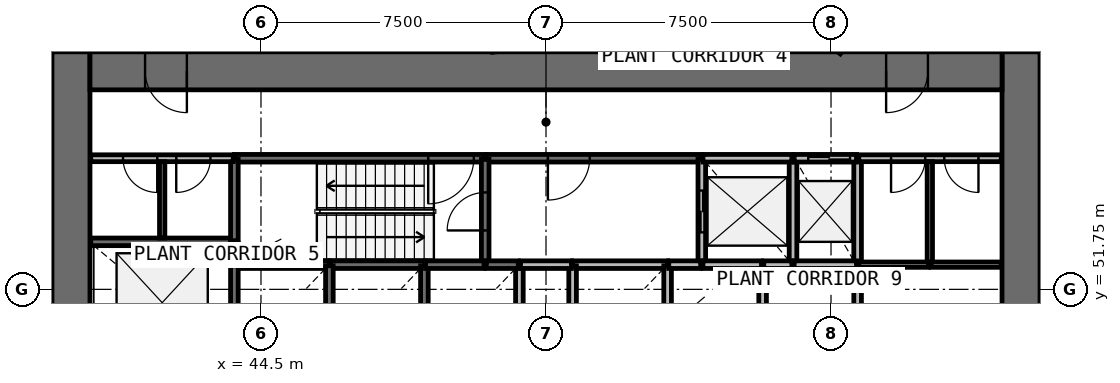
"""IFC4 building model, lengths in metres.
Left out: names, types, materials, properties, quantities, classifications, styles, units other than length and angle.
Written with IfcOpenShell. Run it as: python <this file> out.ifc"""

import sys

from ifc_helpers import new_model, si_unit, direction, frame, frame_2d, origin, place, context, subcontext, project, spatial, rectangle, extrude, source, transform, mapped, element, fill, save


model = new_model("IFC4")
c1 = context("Model", 3, precision=1e-05, world=origin(), true_north=direction((0.0, 1.0)))
c2 = subcontext(c1, "Body", "Model", "MODEL_VIEW")
j1 = project(units=[si_unit("LENGTHUNIT", "METRE"), si_unit("PLANEANGLEUNIT", "RADIAN")], contexts=[c1])
p1 = place(None, origin())
s1 = spatial("IfcSite", under=j1, at=p1, CompositionType="ELEMENT")
p2 = place(p1, origin())
s2 = spatial("IfcBuilding", under=s1, at=p2, CompositionType="ELEMENT")
p3 = place(p2, frame((0.0, 0.0, 75.4)))
s3 = spatial("IfcBuildingStorey", under=s2, at=p3, CompositionType="ELEMENT", Elevation=75.4)
p4 = place(p3, frame((64.5, 38.0, 0.0), z_axis=(0.0, 0.0, 1.0), x_axis=(0.0, 1.0, 0.0)))
e1 = element("IfcWall", 1, at=p4, inside=s3, PredefinedType="SHEAR", context=c2, shape_type="SweptSolid", body=[
    extrude(rectangle(XDim=20.0, YDim=1.0, at=frame_2d((10.0, 0.0))), origin(), (0.0, 0.0, 1.0), 4.4),
])
p5 = place(p4, frame((9.1, 0.0, 0.0)))
e2 = element("IfcOpeningElement", 2, at=p5, cuts=e1, PredefinedType="OPENING", context=c2, shape_type="SweptSolid", body=[
    extrude(rectangle(XDim=1.8, YDim=2.1, at=frame_2d((0.9, 1.05))), frame((0.0, 0.51, 0.0), z_axis=(0.0, -1.0, 0.0), x_axis=(1.0, 0.0, 0.0)), (0.0, 0.0, 1.0), 1.02),
])
p6 = place(p3, frame((39.5, 58.0, 0.0), z_axis=(0.0, 0.0, 1.0), x_axis=(0.0, -1.0, 0.0)))
e3 = element("IfcWall", 3, at=p6, inside=s3, PredefinedType="SHEAR", context=c2, shape_type="SweptSolid", body=[
    extrude(rectangle(XDim=20.0, YDim=1.0, at=frame_2d((10.0, 0.0))), origin(), (0.0, 0.0, 1.0), 4.4),
])
p7 = place(p6, frame((9.1, 0.0, 0.0)))
e4 = element("IfcOpeningElement", 4, at=p7, cuts=e3, PredefinedType="OPENING", context=c2, shape_type="SweptSolid", body=[
    extrude(rectangle(XDim=1.8, YDim=2.1, at=frame_2d((0.9, 1.05))), frame((0.0, 0.51, 0.0), z_axis=(0.0, -1.0, 0.0), x_axis=(1.0, 0.0, 0.0)), (0.0, 0.0, 1.0), 1.02),
])
p8 = place(p3, frame((64.0, 57.5, 0.0), z_axis=(0.0, 0.0, 1.0), x_axis=(-1.0, 0.0, 0.0)))
e5 = element("IfcWall", 5, at=p8, inside=s3, PredefinedType="SHEAR", context=c2, shape_type="SweptSolid", body=[
    extrude(rectangle(XDim=24.0, YDim=1.0, at=frame_2d((12.0, 0.0))), origin(), (0.0, 0.0, 1.0), 4.4),
])
p9 = place(p8, frame((21.45, 0.0, 0.0)))
e6 = element("IfcOpeningElement", 6, at=p9, cuts=e5, PredefinedType="OPENING", context=c2, shape_type="SweptSolid", body=[
    extrude(rectangle(XDim=1.1, YDim=2.1, at=frame_2d((0.55, 1.05))), frame((0.0, 0.51, 0.0), z_axis=(0.0, -1.0, 0.0), x_axis=(1.0, 0.0, 0.0)), (0.0, 0.0, 1.0), 1.02),
])
p10 = place(p8, frame((1.95, 0.0, 0.0)))
e7 = element("IfcOpeningElement", 7, at=p10, cuts=e5, PredefinedType="OPENING", context=c2, shape_type="SweptSolid", body=[
    extrude(rectangle(XDim=1.1, YDim=2.1, at=frame_2d((0.55, 1.05))), frame((0.0, 0.51, 0.0), z_axis=(0.0, -1.0, 0.0), x_axis=(1.0, 0.0, 0.0)), (0.0, 0.0, 1.0), 1.02),
])
p11 = place(p3, frame((50.4, 55.2, 0.0), z_axis=(0.0, 0.0, 1.0), x_axis=(-1.0, 0.0, 0.0)))
e8 = element("IfcWall", 8, at=p11, inside=s3, PredefinedType="SOLIDWALL", context=c2, shape_type="SweptSolid", body=[
    extrude(rectangle(XDim=6.6, YDim=0.2, at=frame_2d((3.3, 0.0))), origin(), (0.0, 0.0, 1.0), 4.0),
])
p12 = place(p11, frame((0.3, 0.0, 0.0)))
e9 = element("IfcOpeningElement", 9, at=p12, cuts=e8, PredefinedType="OPENING", context=c2, shape_type="SweptSolid", body=[
    extrude(rectangle(XDim=1.2, YDim=2.1, at=frame_2d((0.6, 1.05))), frame((0.0, 0.11, 0.0), z_axis=(0.0, -1.0, 0.0), x_axis=(1.0, 0.0, 0.0)), (0.0, 0.0, 1.0), 0.22),
])
p13 = place(p3, frame((56.1, 55.2, 0.0), z_axis=(0.0, 0.0, 1.0), x_axis=(-1.0, 0.0, 0.0)))
e10 = element("IfcWall", 10, at=p13, inside=s3, PredefinedType="SOLIDWALL", context=c2, shape_type="SweptSolid", body=[
    extrude(rectangle(XDim=5.67, YDim=0.2, at=frame_2d((2.835, 0.0))), origin(), (0.0, 0.0, 1.0), 4.0),
])
p14 = place(p13, frame((2.95, 0.0, 0.0)))
e11 = element("IfcOpeningElement", 11, at=p14, cuts=e10, PredefinedType="OPENING", context=c2, shape_type="SweptSolid", body=[
    extrude(rectangle(XDim=1.1, YDim=2.1, at=frame_2d((0.55, 1.05))), frame((0.0, 0.11, 0.0), z_axis=(0.0, -1.0, 0.0), x_axis=(1.0, 0.0, 0.0)), (0.0, 0.0, 1.0), 0.22),
])
p15 = place(p3, frame((43.8, 53.0, 0.0), z_axis=(0.0, 0.0, 1.0), x_axis=(-1.0, 0.0, 0.0)))
e12 = element("IfcWall", 12, at=p15, inside=s3, PredefinedType="SOLIDWALL", context=c2, shape_type="SweptSolid", body=[
    extrude(rectangle(XDim=3.78, YDim=0.2, at=frame_2d((1.89, 0.0))), origin(), (0.0, 0.0, 1.0), 4.0),
])
p16 = place(p3, frame((50.4, 52.4, 0.0), z_axis=(0.0, 0.0, 1.0), x_axis=(0.0, 1.0, 0.0)))
e13 = element("IfcWall", 13, at=p16, inside=s3, PredefinedType="SOLIDWALL", context=c2, shape_type="SweptSolid", body=[
    extrude(rectangle(XDim=2.77, YDim=0.2, at=frame_2d((1.385, 0.0))), origin(), (0.0, 0.0, 1.0), 4.0),
])
p17 = place(p16, frame((0.9, 0.0, 0.0)))
e14 = element("IfcOpeningElement", 14, at=p17, cuts=e13, PredefinedType="OPENING", context=c2, shape_type="SweptSolid", body=[
    extrude(rectangle(XDim=1.0, YDim=2.1, at=frame_2d((0.5, 1.05))), frame((0.0, 0.11, 0.0), z_axis=(0.0, -1.0, 0.0), x_axis=(1.0, 0.0, 0.0)), (0.0, 0.0, 1.0), 0.22),
])
p18 = place(p3, frame((56.1, 55.17, 0.0), z_axis=(0.0, 0.0, 1.0), x_axis=(0.0, -1.0, 0.0)))
e15 = element("IfcWall", 15, at=p18, inside=s3, PredefinedType="SOLIDWALL", context=c2, shape_type="SweptSolid", body=[
    extrude(rectangle(XDim=2.77, YDim=0.2, at=frame_2d((1.385, 0.0))), origin(), (0.0, 0.0, 1.0), 4.0),
])
p19 = place(p18, frame((0.82, 0.0, 0.0)))
e16 = element("IfcOpeningElement", 16, at=p19, cuts=e15, PredefinedType="OPENING", context=c2, shape_type="SweptSolid", body=[
    extrude(rectangle(XDim=1.1, YDim=2.1, at=frame_2d((0.55, 1.05))), frame((0.0, 0.11, 0.0), z_axis=(0.0, -1.0, 0.0), x_axis=(1.0, 0.0, 0.0)), (0.0, 0.0, 1.0), 0.22),
])
for number, where, z_axis, x_axis in (
    (17, (58.5, 52.4, 0.0), (0.0, 0.0, 1.0), (0.0, 1.0, 0.0)),
    (18, (60.2, 52.4, 0.0), (0.0, 0.0, 1.0), (0.0, 1.0, 0.0)),
):
    element("IfcWall", number, at=place(p3, frame(where, z_axis=z_axis, x_axis=x_axis)), inside=s3, PredefinedType="SOLIDWALL", context=c2, shape_type="SweptSolid", body=[
        extrude(rectangle(XDim=2.8, YDim=0.2, at=frame_2d((1.4, 0.0))), origin(), (0.0, 0.0, 1.0), 4.0),
    ])
p20 = place(p3, frame((46.3, 52.4, 0.0), z_axis=(0.0, 0.0, 1.0), x_axis=(-1.0, 0.0, 0.0)))
e19 = element("IfcWall", 19, at=p20, inside=s3, PredefinedType="SOLIDWALL", context=c2, shape_type="SweptSolid", body=[
    extrude(rectangle(XDim=2.5, YDim=0.2, at=frame_2d((1.25, 0.0))), origin(), (0.0, 0.0, 1.0), 4.0),
])
p21 = place(p3, frame((48.8, 52.4, 0.0), z_axis=(0.0, 0.0, 1.0), x_axis=(-1.0, 0.0, 0.0)))
e20 = element("IfcWall", 20, at=p21, inside=s3, PredefinedType="SOLIDWALL", context=c2, shape_type="SweptSolid", body=[
    extrude(rectangle(XDim=2.47, YDim=0.2, at=frame_2d((1.235, 0.0))), origin(), (0.0, 0.0, 1.0), 4.0),
])
p22 = place(p3, frame((55.2, 52.4, 0.0), z_axis=(0.0, 0.0, 1.0), x_axis=(-1.0, 0.0, 0.0)))
e21 = element("IfcWall", 21, at=p22, inside=s3, PredefinedType="SOLIDWALL", context=c2, shape_type="SweptSolid", body=[
    extrude(rectangle(XDim=2.5, YDim=0.2, at=frame_2d((1.25, 0.0))), origin(), (0.0, 0.0, 1.0), 4.0),
])
p23 = place(p3, frame((58.47, 55.2, 0.0), z_axis=(0.0, 0.0, 1.0), x_axis=(-1.0, 0.0, 0.0)))
e22 = element("IfcWall", 22, at=p23, inside=s3, PredefinedType="SOLIDWALL", context=c2, shape_type="SweptSolid", body=[
    extrude(rectangle(XDim=2.34, YDim=0.2, at=frame_2d((1.17, 0.0))), origin(), (0.0, 0.0, 1.0), 4.0),
])
for number, where, z_axis, x_axis in (
    (23, (43.8, 52.37, 0.0), (0.0, 0.0, 1.0), (0.0, -1.0, 0.0)),
    (24, (46.3, 50.01, 0.0), (0.0, 0.0, 1.0), (0.0, 1.0, 0.0)),
    (25, (48.8, 50.01, 0.0), (0.0, 0.0, 1.0), (0.0, 1.0, 0.0)),
):
    element("IfcWall", number, at=place(p3, frame(where, z_axis=z_axis, x_axis=x_axis)), inside=s3, PredefinedType="SOLIDWALL", context=c2, shape_type="SweptSolid", body=[
        extrude(rectangle(XDim=2.36, YDim=0.2, at=frame_2d((1.18, 0.0))), origin(), (0.0, 0.0, 1.0), 4.0),
    ])
p24 = place(p3, frame((51.3, 50.01, 0.0), z_axis=(0.0, 0.0, 1.0), x_axis=(0.0, 1.0, 0.0)))
e26 = element("IfcWall", 26, at=p24, inside=s3, PredefinedType="SOLIDWALL", context=c2, shape_type="SweptSolid", body=[
    extrude(rectangle(XDim=2.39, YDim=0.2, at=frame_2d((1.195, 0.0))), origin(), (0.0, 0.0, 1.0), 4.0),
])
for number, where, z_axis, x_axis in (
    (27, (52.7, 52.37, 0.0), (0.0, 0.0, 1.0), (0.0, -1.0, 0.0)),
    (28, (55.2, 50.01, 0.0), (0.0, 0.0, 1.0), (0.0, 1.0, 0.0)),
):
    element("IfcWall", number, at=place(p3, frame(where, z_axis=z_axis, x_axis=x_axis)), inside=s3, PredefinedType="SOLIDWALL", context=c2, shape_type="SweptSolid", body=[
        extrude(rectangle(XDim=2.36, YDim=0.2, at=frame_2d((1.18, 0.0))), origin(), (0.0, 0.0, 1.0), 4.0),
    ])
p25 = place(p3, frame((57.7, 50.01, 0.0), z_axis=(0.0, 0.0, 1.0), x_axis=(0.0, 1.0, 0.0)))
e29 = element("IfcWall", 29, at=p25, inside=s3, PredefinedType="SOLIDWALL", context=c2, shape_type="SweptSolid", body=[
    extrude(rectangle(XDim=2.39, YDim=0.2, at=frame_2d((1.195, 0.0))), origin(), (0.0, 0.0, 1.0), 4.0),
])
p26 = place(p3, frame((60.2, 50.01, 0.0), z_axis=(0.0, 0.0, 1.0), x_axis=(0.0, 1.0, 0.0)))
e30 = element("IfcWall", 30, at=p26, inside=s3, PredefinedType="SOLIDWALL", context=c2, shape_type="SweptSolid", body=[
    extrude(rectangle(XDim=2.36, YDim=0.2, at=frame_2d((1.18, 0.0))), origin(), (0.0, 0.0, 1.0), 4.0),
])
p27 = place(p3, frame((43.8, 55.17, 0.0), z_axis=(0.0, 0.0, 1.0), x_axis=(0.0, -1.0, 0.0)))
e31 = element("IfcWall", 31, at=p27, inside=s3, PredefinedType="SOLIDWALL", context=c2, shape_type="SweptSolid", body=[
    extrude(rectangle(XDim=2.14, YDim=0.2, at=frame_2d((1.07, 0.0))), origin(), (0.0, 0.0, 1.0), 4.0),
])
p28 = place(p3, frame((60.17, 52.4, 0.0), z_axis=(0.0, 0.0, 1.0), x_axis=(-1.0, 0.0, 0.0)))
e32 = element("IfcWall", 32, at=p28, inside=s3, PredefinedType="SOLIDWALL", context=c2, shape_type="SweptSolid", body=[
    extrude(rectangle(XDim=1.64, YDim=0.2, at=frame_2d((0.82, 0.0))), origin(), (0.0, 0.0, 1.0), 4.0),
])
p29 = place(p3, frame((60.17, 55.2, 0.0), z_axis=(0.0, 0.0, 1.0), x_axis=(-1.0, 0.0, 0.0)))
e33 = element("IfcWall", 33, at=p29, inside=s3, PredefinedType="SOLIDWALL", context=c2, shape_type="SweptSolid", body=[
    extrude(rectangle(XDim=1.64, YDim=0.2, at=frame_2d((0.82, 0.0))), origin(), (0.0, 0.0, 1.0), 4.0),
])
p30 = place(p29, frame((0.17, 0.0, 0.0)))
e34 = element("IfcOpeningElement", 34, at=p30, cuts=e33, PredefinedType="OPENING", context=c2, shape_type="SweptSolid", body=[
    extrude(rectangle(XDim=1.1, YDim=2.1, at=frame_2d((0.55, 1.05))), frame((0.0, 0.11, 0.0), z_axis=(0.0, -1.0, 0.0), x_axis=(1.0, 0.0, 0.0)), (0.0, 0.0, 1.0), 0.22),
])
for number, where, z_axis, x_axis in (
    (35, (50.37, 52.4, 0.0), (0.0, 0.0, 1.0), (-1.0, 0.0, 0.0)),
    (36, (57.67, 52.4, 0.0), (0.0, 0.0, 1.0), (-1.0, 0.0, 0.0)),
):
    element("IfcWall", number, at=place(p3, frame(where, z_axis=z_axis, x_axis=x_axis)), inside=s3, PredefinedType="SOLIDWALL", context=c2, shape_type="SweptSolid", body=[
        extrude(rectangle(XDim=1.54, YDim=0.2, at=frame_2d((0.77, 0.0))), origin(), (0.0, 0.0, 1.0), 4.0),
    ])
p31 = place(p3, frame((51.33, 52.4, 0.0), z_axis=(0.0, 0.0, 1.0), x_axis=(1.0, 0.0, 0.0)))
e37 = element("IfcWall", 37, at=p31, inside=s3, PredefinedType="SOLIDWALL", context=c2, shape_type="SweptSolid", body=[
    extrude(rectangle(XDim=1.34, YDim=0.2, at=frame_2d((0.67, 0.0))), origin(), (0.0, 0.0, 1.0), 4.0),
])
for number, where, z_axis, x_axis in (
    (38, (51.27, 52.4, 0.0), (0.0, 0.0, 1.0), (-1.0, 0.0, 0.0)),
    (39, (56.07, 52.4, 0.0), (0.0, 0.0, 1.0), (-1.0, 0.0, 0.0)),
):
    element("IfcWall", number, at=place(p3, frame(where, z_axis=z_axis, x_axis=x_axis)), inside=s3, PredefinedType="SOLIDWALL", context=c2, shape_type="SweptSolid", body=[
        extrude(rectangle(XDim=0.84, YDim=0.2, at=frame_2d((0.42, 0.0))), origin(), (0.0, 0.0, 1.0), 4.0),
    ])
p32 = place(p3, frame((58.47, 52.4, 0.0), z_axis=(0.0, 0.0, 1.0), x_axis=(-1.0, 0.0, 0.0)))
e40 = element("IfcWall", 40, at=p32, inside=s3, PredefinedType="SOLIDWALL", context=c2, shape_type="SweptSolid", body=[
    extrude(rectangle(XDim=0.74, YDim=0.2, at=frame_2d((0.37, 0.0))), origin(), (0.0, 0.0, 1.0), 4.0),
])
p33 = place(p3, frame((43.8, 52.43, 0.0), z_axis=(0.0, 0.0, 1.0), x_axis=(0.0, 1.0, 0.0)))
e41 = element("IfcWall", 41, at=p33, inside=s3, PredefinedType="SOLIDWALL", context=c2, shape_type="SweptSolid", body=[
    extrude(rectangle(XDim=0.54, YDim=0.2, at=frame_2d((0.27, 0.0))), origin(), (0.0, 0.0, 1.0), 4.0),
])
p34 = place(p3, frame((43.77, 55.2, 0.0), z_axis=(0.0, 0.0, 1.0), x_axis=(-1.0, 0.0, 0.0)))
e42 = element("IfcWall", 42, at=p34, inside=s3, PredefinedType="PARTITIONING", context=c2, shape_type="SweptSolid", body=[
    extrude(rectangle(XDim=3.75, YDim=0.18, at=frame_2d((1.875, 0.0))), origin(), (0.0, 0.0, 1.0), 4.0),
])
p35 = place(p34, frame((2.0, 0.0, 0.0)))
e43 = element("IfcOpeningElement", 43, at=p35, cuts=e42, PredefinedType="OPENING", context=c2, shape_type="SweptSolid", body=[
    extrude(rectangle(XDim=0.9, YDim=2.1, at=frame_2d((0.45, 1.05))), frame((0.0, 0.1, 0.0), z_axis=(0.0, -1.0, 0.0), x_axis=(1.0, 0.0, 0.0)), (0.0, 0.0, 1.0), 0.2),
])
p36 = place(p34, frame((0.6, 0.0, 0.0)))
e44 = element("IfcOpeningElement", 44, at=p36, cuts=e42, PredefinedType="OPENING", context=c2, shape_type="SweptSolid", body=[
    extrude(rectangle(XDim=0.9, YDim=2.1, at=frame_2d((0.45, 1.05))), frame((0.0, 0.1, 0.0), z_axis=(0.0, -1.0, 0.0), x_axis=(1.0, 0.0, 0.0)), (0.0, 0.0, 1.0), 0.2),
])
p37 = place(p3, frame((63.98, 55.2, 0.0), z_axis=(0.0, 0.0, 1.0), x_axis=(-1.0, 0.0, 0.0)))
e45 = element("IfcWall", 45, at=p37, inside=s3, PredefinedType="PARTITIONING", context=c2, shape_type="SweptSolid", body=[
    extrude(rectangle(XDim=3.75, YDim=0.18, at=frame_2d((1.875, 0.0))), origin(), (0.0, 0.0, 1.0), 4.0),
])
p38 = place(p37, frame((2.0, 0.0, 0.0)))
e46 = element("IfcOpeningElement", 46, at=p38, cuts=e45, PredefinedType="OPENING", context=c2, shape_type="SweptSolid", body=[
    extrude(rectangle(XDim=0.9, YDim=2.1, at=frame_2d((0.45, 1.05))), frame((0.0, 0.1, 0.0), z_axis=(0.0, -1.0, 0.0), x_axis=(1.0, 0.0, 0.0)), (0.0, 0.0, 1.0), 0.2),
])
p39 = place(p37, frame((0.6, 0.0, 0.0)))
e47 = element("IfcOpeningElement", 47, at=p39, cuts=e45, PredefinedType="OPENING", context=c2, shape_type="SweptSolid", body=[
    extrude(rectangle(XDim=0.9, YDim=2.1, at=frame_2d((0.45, 1.05))), frame((0.0, 0.1, 0.0), z_axis=(0.0, -1.0, 0.0), x_axis=(1.0, 0.0, 0.0)), (0.0, 0.0, 1.0), 0.2),
])
p40 = place(p3, frame((61.446, 60.31, 0.0), z_axis=(0.0, 0.0, 1.0), x_axis=(-0.608737787706, -0.793371480341, 0.0)))
e48 = element("IfcWall", 48, at=p40, inside=s3, PredefinedType="PARTITIONING", context=c2, shape_type="SweptSolid", body=[
    extrude(rectangle(XDim=2.912, YDim=0.18, at=frame_2d((1.456, 0.0))), origin(), (0.0, 0.0, 1.0), 2.8),
])
p41 = place(p40, frame((0.862, 0.0, 0.0)))
e49 = element("IfcOpeningElement", 49, at=p41, cuts=e48, PredefinedType="OPENING", context=c2, shape_type="SweptSolid", body=[
    extrude(rectangle(XDim=1.2, YDim=2.1, at=frame_2d((0.6, 1.05))), frame((0.0, 0.1, 0.0), z_axis=(0.0, -1.0, 0.0), x_axis=(1.0, 0.0, 0.0)), (0.0, 0.0, 1.0), 0.2),
])
p42 = place(p3, frame((50.371, 60.37, 0.0), z_axis=(0.0, 0.0, 1.0), x_axis=(0.13060507681, -0.991434472828, 0.0)))
e50 = element("IfcWall", 50, at=p42, inside=s3, PredefinedType="PARTITIONING", context=c2, shape_type="SweptSolid", body=[
    extrude(rectangle(XDim=2.391, YDim=0.18, at=frame_2d((1.195, 0.0))), origin(), (0.0, 0.0, 1.0), 2.8),
])
p43 = place(p42, frame((0.541, 0.0, 0.0)))
e51 = element("IfcOpeningElement", 51, at=p43, cuts=e50, PredefinedType="OPENING", context=c2, shape_type="SweptSolid", body=[
    extrude(rectangle(XDim=1.2, YDim=2.1, at=frame_2d((0.6, 1.05))), frame((0.0, 0.1, 0.0), z_axis=(0.0, -1.0, 0.0), x_axis=(1.0, 0.0, 0.0)), (0.0, 0.0, 1.0), 0.2),
])
p44 = place(p3, frame((37.168, 59.381, 0.0), z_axis=(0.0, 0.0, 1.0), x_axis=(0.793393624489, -0.608708926023, 0.0)))
e52 = element("IfcWall", 52, at=p44, inside=s3, PredefinedType="PARTITIONING", context=c2, shape_type="SweptSolid", body=[
    extrude(rectangle(XDim=2.309, YDim=0.18, at=frame_2d((1.155, 0.0))), origin(), (0.0, 0.0, 1.0), 2.8),
])
p45 = place(p44, frame((0.459, 0.0, 0.0)))
e53 = element("IfcOpeningElement", 53, at=p45, cuts=e52, PredefinedType="OPENING", context=c2, shape_type="SweptSolid", body=[
    extrude(rectangle(XDim=1.2, YDim=2.1, at=frame_2d((0.6, 1.05))), frame((0.0, 0.1, 0.0), z_axis=(0.0, -1.0, 0.0), x_axis=(1.0, 0.0, 0.0)), (0.0, 0.0, 1.0), 0.2),
])
p46 = place(p3, frame((62.1, 52.4, 0.0), z_axis=(0.0, 0.0, 1.0), x_axis=(0.0, 1.0, 0.0)))
e54 = element("IfcWall", 54, at=p46, inside=s3, PredefinedType="PARTITIONING", context=c2, shape_type="SweptSolid", body=[
    extrude(rectangle(XDim=2.71, YDim=0.14, at=frame_2d((1.355, 0.0))), origin(), (0.0, 0.0, 1.0), 3.1),
])
p47 = place(p3, frame((41.9, 53.1, 0.0), z_axis=(0.0, 0.0, 1.0), x_axis=(0.0, 1.0, 0.0)))
e55 = element("IfcWall", 55, at=p47, inside=s3, PredefinedType="PARTITIONING", context=c2, shape_type="SweptSolid", body=[
    extrude(rectangle(XDim=2.01, YDim=0.14, at=frame_2d((1.005, 0.0))), origin(), (0.0, 0.0, 1.0), 3.1),
])
p48 = place(p3, frame((62.07, 52.4, 0.0), z_axis=(0.0, 0.0, 1.0), x_axis=(-1.0, 0.0, 0.0)))
e56 = element("IfcWall", 56, at=p48, inside=s3, PredefinedType="PARTITIONING", context=c2, shape_type="SweptSolid", body=[
    extrude(rectangle(XDim=1.84, YDim=0.14, at=frame_2d((0.92, 0.0))), origin(), (0.0, 0.0, 1.0), 3.1),
])
p49 = place(p3, frame((63.98, 52.4, 0.0), z_axis=(0.0, 0.0, 1.0), x_axis=(-1.0, 0.0, 0.0)))
e57 = element("IfcWall", 57, at=p49, inside=s3, PredefinedType="PARTITIONING", context=c2, shape_type="SweptSolid", body=[
    extrude(rectangle(XDim=1.85, YDim=0.14, at=frame_2d((0.925, 0.0))), origin(), (0.0, 0.0, 1.0), 3.1),
])
m1 = source(origin(), c2, "Body", "SweptSolid", [
    extrude(rectangle(XDim=1.1, YDim=2.1, at=frame_2d((0.55, 1.05))), frame((0.0, 0.025, 0.0), z_axis=(0.0, -1.0, 0.0), x_axis=(1.0, 0.0, 0.0)), (0.0, 0.0, 1.0), 0.05),
])
p50 = place(p19, origin())
e58 = element("IfcDoor", 58, at=p50, inside=s3, OperationType="DOUBLE_DOOR_SLIDING", PredefinedType="USERDEFINED", context=c2, shape_type="MappedRepresentation", body=[
    mapped(m1, transform((0.0, 0.0, 0.0), scale=1.0)),
])
fill(e16, e58)
p51 = place(p30, origin())
e59 = element("IfcDoor", 59, at=p51, inside=s3, OperationType="DOUBLE_DOOR_SLIDING", PredefinedType="USERDEFINED", context=c2, shape_type="MappedRepresentation", body=[
    mapped(m1, transform((0.0, 0.0, 0.0), scale=1.0)),
])
fill(e34, e59)
m2 = source(origin(), c2, "Body", "SweptSolid", [
    extrude(rectangle(XDim=1.2, YDim=2.1, at=frame_2d((0.6, 1.05))), frame((0.0, 0.025, 0.0), z_axis=(0.0, -1.0, 0.0), x_axis=(1.0, 0.0, 0.0)), (0.0, 0.0, 1.0), 0.05),
])
p52 = place(p12, origin())
e60 = element("IfcDoor", 60, at=p52, inside=s3, OperationType="SINGLE_SWING_RIGHT", PredefinedType="DOOR", context=c2, shape_type="MappedRepresentation", body=[
    mapped(m2, transform((0.0, 0.0, 0.0), scale=1.0)),
])
fill(e9, e60)
m3 = source(origin(), c2, "Body", "SweptSolid", [
    extrude(rectangle(XDim=1.0, YDim=2.1, at=frame_2d((0.5, 1.05))), frame((0.0, 0.025, 0.0), z_axis=(0.0, -1.0, 0.0), x_axis=(1.0, 0.0, 0.0)), (0.0, 0.0, 1.0), 0.05),
])
p53 = place(p17, origin())
e61 = element("IfcDoor", 61, at=p53, inside=s3, OperationType="SINGLE_SWING_LEFT", PredefinedType="DOOR", context=c2, shape_type="MappedRepresentation", body=[
    mapped(m3, transform((0.0, 0.0, 0.0), scale=1.0)),
])
fill(e14, e61)
m4 = source(origin(), c2, "Body", "SweptSolid", [
    extrude(rectangle(XDim=1.1, YDim=2.1, at=frame_2d((0.55, 1.05))), frame((0.0, 0.025, 0.0), z_axis=(0.0, -1.0, 0.0), x_axis=(1.0, 0.0, 0.0)), (0.0, 0.0, 1.0), 0.05),
])
p54 = place(p14, origin())
e62 = element("IfcDoor", 62, at=p54, inside=s3, OperationType="SINGLE_SWING_RIGHT", PredefinedType="DOOR", context=c2, shape_type="MappedRepresentation", body=[
    mapped(m4, transform((0.0, 0.0, 0.0), scale=1.0)),
])
fill(e11, e62)
m5 = source(origin(), c2, "Body", "SweptSolid", [
    extrude(rectangle(XDim=1.1, YDim=2.1, at=frame_2d((0.55, 1.05))), frame((0.0, 0.025, 0.0), z_axis=(0.0, -1.0, 0.0), x_axis=(1.0, 0.0, 0.0)), (0.0, 0.0, 1.0), 0.05),
])
p55 = place(p9, origin())
e63 = element("IfcDoor", 63, at=p55, inside=s3, OperationType="SINGLE_SWING_LEFT", PredefinedType="DOOR", context=c2, shape_type="MappedRepresentation", body=[
    mapped(m5, transform((0.0, 0.0, 0.0), scale=1.0)),
])
fill(e6, e63)
p56 = place(p10, origin())
e64 = element("IfcDoor", 64, at=p56, inside=s3, OperationType="SINGLE_SWING_RIGHT", PredefinedType="DOOR", context=c2, shape_type="MappedRepresentation", body=[
    mapped(m5, transform((0.0, 0.0, 0.0), scale=1.0)),
])
fill(e7, e64)
m6 = source(origin(), c2, "Body", "SweptSolid", [
    extrude(rectangle(XDim=0.9, YDim=2.1, at=frame_2d((0.45, 1.05))), frame((0.0, 0.025, 0.0), z_axis=(0.0, -1.0, 0.0), x_axis=(1.0, 0.0, 0.0)), (0.0, 0.0, 1.0), 0.05),
])
p57 = place(p35, origin())
e65 = element("IfcDoor", 65, at=p57, inside=s3, OperationType="SINGLE_SWING_LEFT", PredefinedType="DOOR", context=c2, shape_type="MappedRepresentation", body=[
    mapped(m6, transform((0.0, 0.0, 0.0), scale=1.0)),
])
fill(e43, e65)
p58 = place(p36, origin())
e66 = element("IfcDoor", 66, at=p58, inside=s3, OperationType="SINGLE_SWING_RIGHT", PredefinedType="DOOR", context=c2, shape_type="MappedRepresentation", body=[
    mapped(m6, transform((0.0, 0.0, 0.0), scale=1.0)),
])
fill(e44, e66)
p59 = place(p38, origin())
e67 = element("IfcDoor", 67, at=p59, inside=s3, OperationType="SINGLE_SWING_RIGHT", PredefinedType="DOOR", context=c2, shape_type="MappedRepresentation", body=[
    mapped(m6, transform((0.0, 0.0, 0.0), scale=1.0)),
])
fill(e46, e67)
p60 = place(p39, origin())
e68 = element("IfcDoor", 68, at=p60, inside=s3, OperationType="SINGLE_SWING_LEFT", PredefinedType="DOOR", context=c2, shape_type="MappedRepresentation", body=[
    mapped(m6, transform((0.0, 0.0, 0.0), scale=1.0)),
])
fill(e47, e68)
save(model, sys.argv[1])
